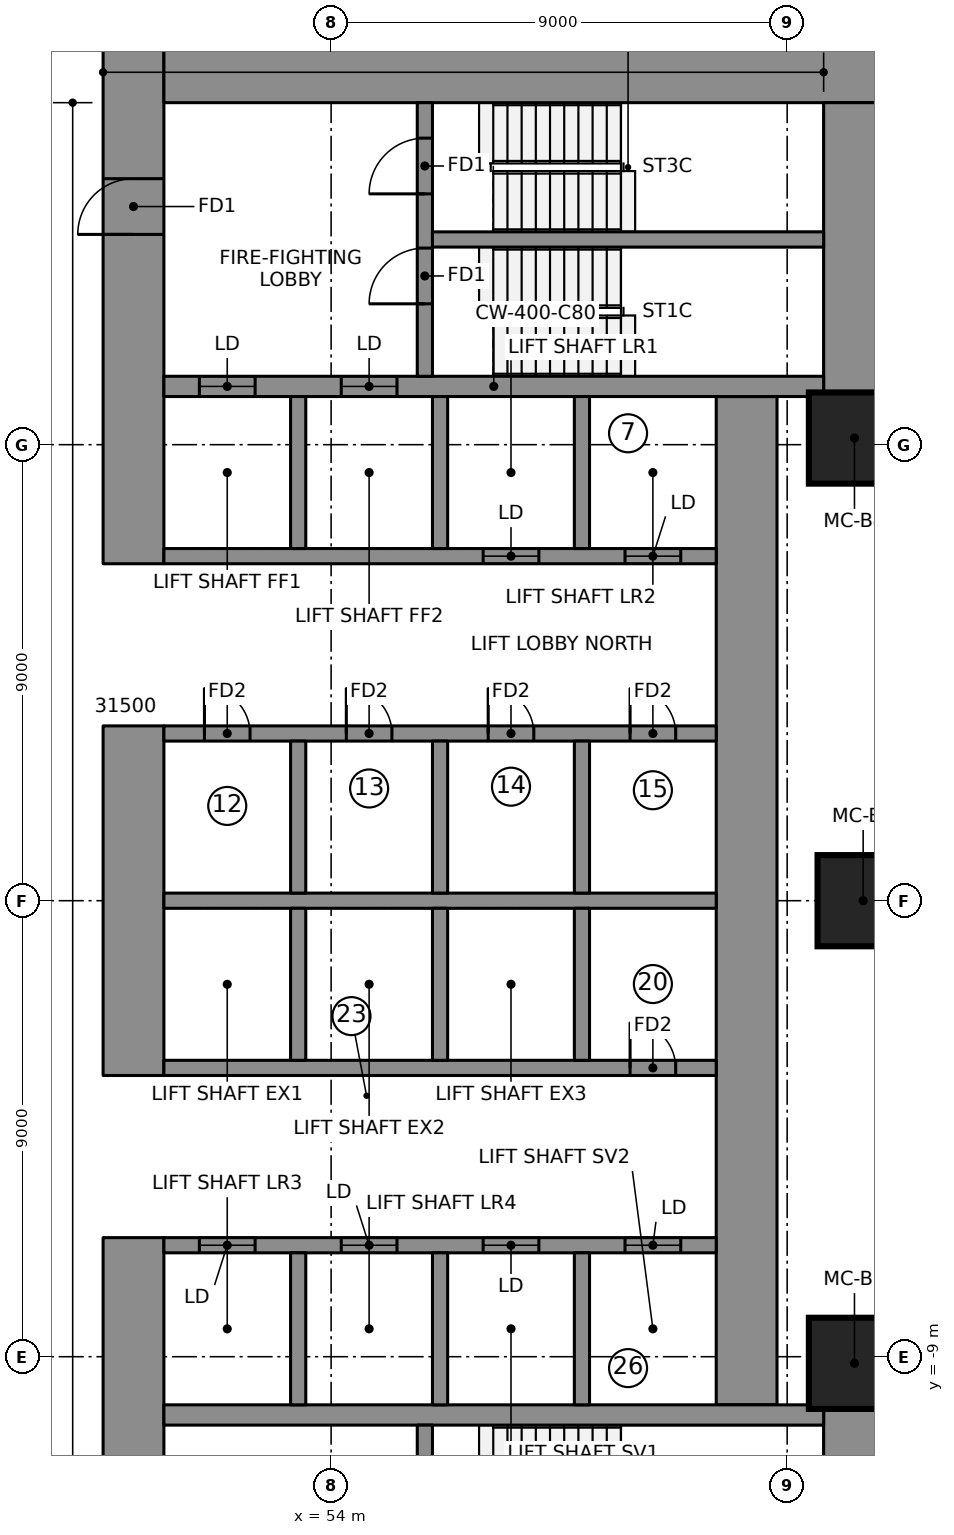
"""IFC4 building model, lengths in metres.
Left out: names, types, materials, properties, quantities, classifications, styles, units other than length and angle.
Written with IfcOpenShell. Run it as: python <this file> out.ifc"""

import sys

from ifc_helpers import new_model, si_unit, direction, frame, frame_2d, origin, origin_2d, place, context, subcontext, project, spatial, rectangle, extrude, element, fill, save


model = new_model("IFC4")
c1 = context("Model", 3, precision=1e-05, world=origin(), true_north=direction((0.0, 1.0)))
c2 = subcontext(c1, "Body", "Model", "MODEL_VIEW")
j1 = project(units=[si_unit("LENGTHUNIT", "METRE"), si_unit("PLANEANGLEUNIT", "RADIAN")], contexts=[c1])
p1 = place(None, origin())
s1 = spatial("IfcSite", under=j1, at=p1, CompositionType="ELEMENT")
p2 = place(p1, origin())
s2 = spatial("IfcBuilding", under=s1, at=p2, CompositionType="ELEMENT")
p3 = place(p2, frame((0.0, 0.0, 71.55)))
s3 = spatial("IfcBuildingStorey", under=s2, at=p3, CompositionType="ELEMENT", Elevation=71.55)
p4 = place(p3, frame((50.1, 6.65, 0.0), z_axis=(0.0, 0.0, 1.0), x_axis=(0.0, 1.0, 0.0)))
e1 = element("IfcWall", 1, at=p4, inside=s3, PredefinedType="SHEAR", context=c2, shape_type="SweptSolid", body=[
    extrude(rectangle(XDim=10.3, YDim=1.2, at=frame_2d((5.15, 0.0))), origin(), (0.0, 0.0, 1.0), 3.55),
])
p5 = place(p4, frame((6.5, 0.0, 0.0)))
e2 = element("IfcOpeningElement", 2, at=p5, cuts=e1, PredefinedType="OPENING", context=c2, shape_type="SweptSolid", body=[
    extrude(rectangle(XDim=1.1, YDim=2.1, at=frame_2d((0.55, 1.05))), frame((0.0, 0.61, 0.0), z_axis=(0.0, -1.0, 0.0), x_axis=(1.0, 0.0, 0.0)), (0.0, 0.0, 1.0), 1.22),
])
p6 = place(p3, frame((50.1, -3.45, 0.0), z_axis=(0.0, 0.0, 1.0), x_axis=(0.0, 1.0, 0.0)))
e3 = element("IfcWall", 3, at=p6, inside=s3, PredefinedType="SHEAR", context=c2, shape_type="SweptSolid", body=[
    extrude(rectangle(XDim=6.9, YDim=1.2, at=frame_2d((3.45, 0.0))), origin(), (0.0, 0.0, 1.0), 3.55),
])
p7 = place(p3, frame((50.1, -16.95, 0.0), z_axis=(0.0, 0.0, 1.0), x_axis=(0.0, 1.0, 0.0)))
e4 = element("IfcWall", 4, at=p7, inside=s3, PredefinedType="SHEAR", context=c2, shape_type="SweptSolid", body=[
    extrude(rectangle(XDim=10.3, YDim=1.2, at=frame_2d((5.15, 0.0))), origin(), (0.0, 0.0, 1.0), 3.55),
])
p8 = place(p7, frame((2.7, 0.0, 0.0)))
e5 = element("IfcOpeningElement", 5, at=p8, cuts=e4, PredefinedType="OPENING", context=c2, shape_type="SweptSolid", body=[
    extrude(rectangle(XDim=1.1, YDim=2.1, at=frame_2d((0.55, 1.05))), frame((0.0, 0.61, 0.0), z_axis=(0.0, -1.0, 0.0), x_axis=(1.0, 0.0, 0.0)), (0.0, 0.0, 1.0), 1.22),
])
p9 = place(p3, frame((50.7, 16.35, 0.0), z_axis=(0.0, 0.0, 1.0), x_axis=(1.0, 0.0, 0.0)))
e6 = element("IfcWall", 6, at=p9, inside=s3, PredefinedType="SHEAR", context=c2, shape_type="SweptSolid", body=[
    extrude(rectangle(XDim=14.22, YDim=1.2, at=frame_2d((7.11, 0.0))), origin(), (0.0, 0.0, 1.0), 3.55),
])
for number, where, z_axis, x_axis in (
    (7, (64.32, 9.95, 0.0), (0.0, 0.0, 1.0), (0.0, 1.0, 0.0)),
    (8, (64.32, -15.75, 0.0), (0.0, 0.0, 1.0), (0.0, 1.0, 0.0)),
):
    element("IfcWall", number, at=place(p3, frame(where, z_axis=z_axis, x_axis=x_axis)), inside=s3, PredefinedType="SHEAR", context=c2, shape_type="SweptSolid", body=[
        extrude(rectangle(XDim=5.8, YDim=1.2, at=frame_2d((2.9, 0.0))), origin(), (0.0, 0.0, 1.0), 3.55),
    ])
p10 = place(p3, frame((62.2, -9.95, 0.0), z_axis=(0.0, 0.0, 1.0), x_axis=(0.0, 1.0, 0.0)))
e9 = element("IfcWall", 9, at=p10, inside=s3, PredefinedType="SHEAR", context=c2, shape_type="SweptSolid", body=[
    extrude(rectangle(XDim=19.9, YDim=1.2, at=frame_2d((9.95, 0.0))), origin(), (0.0, 0.0, 1.0), 3.55),
])
p11 = place(p3, frame((50.7, 10.15, 0.0), z_axis=(0.0, 0.0, 1.0), x_axis=(1.0, 0.0, 0.0)))
e10 = element("IfcWall", 10, at=p11, inside=s3, PredefinedType="SHEAR", context=c2, shape_type="SweptSolid", body=[
    extrude(rectangle(XDim=13.02, YDim=0.4, at=frame_2d((6.51, 0.0))), origin(), (0.0, 0.0, 1.0), 3.55),
])
p12 = place(p11, frame((0.7, 0.0, 0.0)))
e11 = element("IfcOpeningElement", 11, at=p12, cuts=e10, PredefinedType="OPENING", context=c2, shape_type="SweptSolid", body=[
    extrude(rectangle(XDim=1.1, YDim=2.1, at=frame_2d((0.55, 1.05))), frame((0.0, 0.21, 0.0), z_axis=(0.0, -1.0, 0.0), x_axis=(1.0, 0.0, 0.0)), (0.0, 0.0, 1.0), 0.42),
])
p13 = place(p11, frame((3.5, 0.0, 0.0)))
e12 = element("IfcOpeningElement", 12, at=p13, cuts=e10, PredefinedType="OPENING", context=c2, shape_type="SweptSolid", body=[
    extrude(rectangle(XDim=1.1, YDim=2.1, at=frame_2d((0.55, 1.05))), frame((0.0, 0.21, 0.0), z_axis=(0.0, -1.0, 0.0), x_axis=(1.0, 0.0, 0.0)), (0.0, 0.0, 1.0), 0.42),
])
p14 = place(p3, frame((50.7, -10.15, 0.0), z_axis=(0.0, 0.0, 1.0), x_axis=(1.0, 0.0, 0.0)))
e13 = element("IfcWall", 13, at=p14, inside=s3, PredefinedType="SHEAR", context=c2, shape_type="SweptSolid", body=[
    extrude(rectangle(XDim=13.02, YDim=0.4, at=frame_2d((6.51, 0.0))), origin(), (0.0, 0.0, 1.0), 3.55),
])
p15 = place(p3, frame((50.7, 0.0, 0.0), z_axis=(0.0, 0.0, 1.0), x_axis=(1.0, 0.0, 0.0)))
e14 = element("IfcWall", 14, at=p15, inside=s3, PredefinedType="SHEAR", context=c2, shape_type="SweptSolid", body=[
    extrude(rectangle(XDim=10.9, YDim=0.3, at=frame_2d((5.45, 0.0))), origin(), (0.0, 0.0, 1.0), 3.55),
])
p16 = place(p3, frame((50.7, 3.3, 0.0), z_axis=(0.0, 0.0, 1.0), x_axis=(1.0, 0.0, 0.0)))
e15 = element("IfcWall", 15, at=p16, inside=s3, PredefinedType="SHEAR", context=c2, shape_type="SweptSolid", body=[
    extrude(rectangle(XDim=10.9, YDim=0.3, at=frame_2d((5.45, 0.0))), origin(), (0.0, 0.0, 1.0), 3.55),
])
p17 = place(p16, frame((0.8, 0.0, 0.0)))
e16 = element("IfcOpeningElement", 16, at=p17, cuts=e15, PredefinedType="OPENING", context=c2, shape_type="SweptSolid", body=[
    extrude(rectangle(XDim=0.9, YDim=2.1, at=frame_2d((0.45, 1.05))), frame((0.0, 0.16, 0.0), z_axis=(0.0, -1.0, 0.0), x_axis=(1.0, 0.0, 0.0)), (0.0, 0.0, 1.0), 0.32),
])
p18 = place(p16, frame((3.6, 0.0, 0.0)))
e17 = element("IfcOpeningElement", 17, at=p18, cuts=e15, PredefinedType="OPENING", context=c2, shape_type="SweptSolid", body=[
    extrude(rectangle(XDim=0.9, YDim=2.1, at=frame_2d((0.45, 1.05))), frame((0.0, 0.16, 0.0), z_axis=(0.0, -1.0, 0.0), x_axis=(1.0, 0.0, 0.0)), (0.0, 0.0, 1.0), 0.32),
])
p19 = place(p16, frame((6.4, 0.0, 0.0)))
e18 = element("IfcOpeningElement", 18, at=p19, cuts=e15, PredefinedType="OPENING", context=c2, shape_type="SweptSolid", body=[
    extrude(rectangle(XDim=0.9, YDim=2.1, at=frame_2d((0.45, 1.05))), frame((0.0, 0.16, 0.0), z_axis=(0.0, -1.0, 0.0), x_axis=(1.0, 0.0, 0.0)), (0.0, 0.0, 1.0), 0.32),
])
p20 = place(p16, frame((9.2, 0.0, 0.0)))
e19 = element("IfcOpeningElement", 19, at=p20, cuts=e15, PredefinedType="OPENING", context=c2, shape_type="SweptSolid", body=[
    extrude(rectangle(XDim=0.9, YDim=2.1, at=frame_2d((0.45, 1.05))), frame((0.0, 0.16, 0.0), z_axis=(0.0, -1.0, 0.0), x_axis=(1.0, 0.0, 0.0)), (0.0, 0.0, 1.0), 0.32),
])
p21 = place(p3, frame((50.7, 6.8, 0.0), z_axis=(0.0, 0.0, 1.0), x_axis=(1.0, 0.0, 0.0)))
e20 = element("IfcWall", 20, at=p21, inside=s3, PredefinedType="SHEAR", context=c2, shape_type="SweptSolid", body=[
    extrude(rectangle(XDim=10.9, YDim=0.3, at=frame_2d((5.45, 0.0))), origin(), (0.0, 0.0, 1.0), 3.55),
])
p22 = place(p21, frame((6.3, 0.0, 0.0)))
e21 = element("IfcOpeningElement", 21, at=p22, cuts=e20, PredefinedType="OPENING", context=c2, shape_type="SweptSolid", body=[
    extrude(rectangle(XDim=1.1, YDim=2.1, at=frame_2d((0.55, 1.05))), frame((0.0, 0.16, 0.0), z_axis=(0.0, -1.0, 0.0), x_axis=(1.0, 0.0, 0.0)), (0.0, 0.0, 1.0), 0.32),
])
p23 = place(p21, frame((9.1, 0.0, 0.0)))
e22 = element("IfcOpeningElement", 22, at=p23, cuts=e20, PredefinedType="OPENING", context=c2, shape_type="SweptSolid", body=[
    extrude(rectangle(XDim=1.1, YDim=2.1, at=frame_2d((0.55, 1.05))), frame((0.0, 0.16, 0.0), z_axis=(0.0, -1.0, 0.0), x_axis=(1.0, 0.0, 0.0)), (0.0, 0.0, 1.0), 0.32),
])
for number, where, z_axis, x_axis in (
    (23, (53.35, 0.15, 0.0), (0.0, 0.0, 1.0), (0.0, 1.0, 0.0)),
    (24, (53.35, 6.95, 0.0), (0.0, 0.0, 1.0), (0.0, 1.0, 0.0)),
    (25, (56.15, 0.15, 0.0), (0.0, 0.0, 1.0), (0.0, 1.0, 0.0)),
    (26, (56.15, 6.95, 0.0), (0.0, 0.0, 1.0), (0.0, 1.0, 0.0)),
    (27, (58.95, 0.15, 0.0), (0.0, 0.0, 1.0), (0.0, 1.0, 0.0)),
    (28, (58.95, 6.95, 0.0), (0.0, 0.0, 1.0), (0.0, 1.0, 0.0)),
):
    element("IfcWall", number, at=place(p3, frame(where, z_axis=z_axis, x_axis=x_axis)), inside=s3, PredefinedType="SHEAR", context=c2, shape_type="SweptSolid", body=[
        extrude(rectangle(XDim=3.0, YDim=0.3, at=frame_2d((1.5, 0.0))), origin(), (0.0, 0.0, 1.0), 3.55),
    ])
p24 = place(p3, frame((50.7, -3.3, 0.0), z_axis=(0.0, 0.0, 1.0), x_axis=(1.0, 0.0, 0.0)))
e29 = element("IfcWall", 29, at=p24, inside=s3, PredefinedType="SHEAR", context=c2, shape_type="SweptSolid", body=[
    extrude(rectangle(XDim=10.9, YDim=0.3, at=frame_2d((5.45, 0.0))), origin(), (0.0, 0.0, 1.0), 3.55),
])
p25 = place(p24, frame((9.2, 0.0, 0.0)))
e30 = element("IfcOpeningElement", 30, at=p25, cuts=e29, PredefinedType="OPENING", context=c2, shape_type="SweptSolid", body=[
    extrude(rectangle(XDim=0.9, YDim=2.1, at=frame_2d((0.45, 1.05))), frame((0.0, 0.16, 0.0), z_axis=(0.0, -1.0, 0.0), x_axis=(1.0, 0.0, 0.0)), (0.0, 0.0, 1.0), 0.32),
])
p26 = place(p3, frame((50.7, -6.8, 0.0), z_axis=(0.0, 0.0, 1.0), x_axis=(1.0, 0.0, 0.0)))
e31 = element("IfcWall", 31, at=p26, inside=s3, PredefinedType="SHEAR", context=c2, shape_type="SweptSolid", body=[
    extrude(rectangle(XDim=10.9, YDim=0.3, at=frame_2d((5.45, 0.0))), origin(), (0.0, 0.0, 1.0), 3.55),
])
p27 = place(p26, frame((0.7, 0.0, 0.0)))
e32 = element("IfcOpeningElement", 32, at=p27, cuts=e31, PredefinedType="OPENING", context=c2, shape_type="SweptSolid", body=[
    extrude(rectangle(XDim=1.1, YDim=2.1, at=frame_2d((0.55, 1.05))), frame((0.0, 0.16, 0.0), z_axis=(0.0, -1.0, 0.0), x_axis=(1.0, 0.0, 0.0)), (0.0, 0.0, 1.0), 0.32),
])
p28 = place(p26, frame((3.5, 0.0, 0.0)))
e33 = element("IfcOpeningElement", 33, at=p28, cuts=e31, PredefinedType="OPENING", context=c2, shape_type="SweptSolid", body=[
    extrude(rectangle(XDim=1.1, YDim=2.1, at=frame_2d((0.55, 1.05))), frame((0.0, 0.16, 0.0), z_axis=(0.0, -1.0, 0.0), x_axis=(1.0, 0.0, 0.0)), (0.0, 0.0, 1.0), 0.32),
])
p29 = place(p26, frame((6.3, 0.0, 0.0)))
e34 = element("IfcOpeningElement", 34, at=p29, cuts=e31, PredefinedType="OPENING", context=c2, shape_type="SweptSolid", body=[
    extrude(rectangle(XDim=1.1, YDim=2.1, at=frame_2d((0.55, 1.05))), frame((0.0, 0.16, 0.0), z_axis=(0.0, -1.0, 0.0), x_axis=(1.0, 0.0, 0.0)), (0.0, 0.0, 1.0), 0.32),
])
p30 = place(p26, frame((9.1, 0.0, 0.0)))
e35 = element("IfcOpeningElement", 35, at=p30, cuts=e31, PredefinedType="OPENING", context=c2, shape_type="SweptSolid", body=[
    extrude(rectangle(XDim=1.1, YDim=2.1, at=frame_2d((0.55, 1.05))), frame((0.0, 0.16, 0.0), z_axis=(0.0, -1.0, 0.0), x_axis=(1.0, 0.0, 0.0)), (0.0, 0.0, 1.0), 0.32),
])
for number, where, z_axis, x_axis in (
    (36, (53.35, -3.15, 0.0), (0.0, 0.0, 1.0), (0.0, 1.0, 0.0)),
    (37, (53.35, -9.95, 0.0), (0.0, 0.0, 1.0), (0.0, 1.0, 0.0)),
    (38, (56.15, -3.15, 0.0), (0.0, 0.0, 1.0), (0.0, 1.0, 0.0)),
    (39, (56.15, -9.95, 0.0), (0.0, 0.0, 1.0), (0.0, 1.0, 0.0)),
    (40, (58.95, -3.15, 0.0), (0.0, 0.0, 1.0), (0.0, 1.0, 0.0)),
    (41, (58.95, -9.95, 0.0), (0.0, 0.0, 1.0), (0.0, 1.0, 0.0)),
):
    element("IfcWall", number, at=place(p3, frame(where, z_axis=z_axis, x_axis=x_axis)), inside=s3, PredefinedType="SHEAR", context=c2, shape_type="SweptSolid", body=[
        extrude(rectangle(XDim=3.0, YDim=0.3, at=frame_2d((1.5, 0.0))), origin(), (0.0, 0.0, 1.0), 3.55),
    ])
p31 = place(p3, frame((55.85, 10.35, 0.0), z_axis=(0.0, 0.0, 1.0), x_axis=(0.0, 1.0, 0.0)))
e42 = element("IfcWall", 42, at=p31, inside=s3, PredefinedType="SHEAR", context=c2, shape_type="SweptSolid", body=[
    extrude(rectangle(XDim=5.4, YDim=0.3, at=frame_2d((2.7, 0.0))), origin(), (0.0, 0.0, 1.0), 3.55),
])
p32 = place(p31, frame((1.43, 0.0, 0.0)))
e43 = element("IfcOpeningElement", 43, at=p32, cuts=e42, PredefinedType="OPENING", context=c2, shape_type="SweptSolid", body=[
    extrude(rectangle(XDim=1.1, YDim=2.1, at=frame_2d((0.55, 1.05))), frame((0.0, 0.16, 0.0), z_axis=(0.0, -1.0, 0.0), x_axis=(1.0, 0.0, 0.0)), (0.0, 0.0, 1.0), 0.32),
])
p33 = place(p31, frame((3.6, 0.0, 0.0)))
e44 = element("IfcOpeningElement", 44, at=p33, cuts=e42, PredefinedType="OPENING", context=c2, shape_type="SweptSolid", body=[
    extrude(rectangle(XDim=1.1, YDim=2.1, at=frame_2d((0.55, 1.05))), frame((0.0, 0.16, 0.0), z_axis=(0.0, -1.0, 0.0), x_axis=(1.0, 0.0, 0.0)), (0.0, 0.0, 1.0), 0.32),
])
p34 = place(p3, frame((55.85, -15.75, 0.0), z_axis=(0.0, 0.0, 1.0), x_axis=(0.0, 1.0, 0.0)))
e45 = element("IfcWall", 45, at=p34, inside=s3, PredefinedType="SHEAR", context=c2, shape_type="SweptSolid", body=[
    extrude(rectangle(XDim=5.4, YDim=0.3, at=frame_2d((2.7, 0.0))), origin(), (0.0, 0.0, 1.0), 3.55),
])
p35 = place(p34, frame((3.6, 0.0, 0.0)))
e46 = element("IfcOpeningElement", 46, at=p35, cuts=e45, PredefinedType="OPENING", context=c2, shape_type="SweptSolid", body=[
    extrude(rectangle(XDim=1.1, YDim=2.1, at=frame_2d((0.55, 1.05))), frame((0.0, 0.16, 0.0), z_axis=(0.0, -1.0, 0.0), x_axis=(1.0, 0.0, 0.0)), (0.0, 0.0, 1.0), 0.32),
])
p36 = place(p34, frame((0.8, 0.0, 0.0)))
e47 = element("IfcOpeningElement", 47, at=p36, cuts=e45, PredefinedType="OPENING", context=c2, shape_type="SweptSolid", body=[
    extrude(rectangle(XDim=0.9, YDim=2.1, at=frame_2d((0.45, 1.05))), frame((0.0, 0.16, 0.0), z_axis=(0.0, -1.0, 0.0), x_axis=(1.0, 0.0, 0.0)), (0.0, 0.0, 1.0), 0.32),
])
p37 = place(p3, frame((56.0, 13.05, 0.0), z_axis=(0.0, 0.0, 1.0), x_axis=(1.0, 0.0, 0.0)))
e48 = element("IfcWall", 48, at=p37, inside=s3, PredefinedType="SHEAR", context=c2, shape_type="SweptSolid", body=[
    extrude(rectangle(XDim=7.72, YDim=0.3, at=frame_2d((3.86, 0.0))), origin(), (0.0, 0.0, 1.0), 3.55),
])
for number, where, z_axis, x_axis in (
    (49, (64.328, -9.131, 0.0), (0.0, 0.0, 1.0), (1.0, 0.0, 0.0)),
    (50, (64.5, 0.0, 0.0), (0.0, 0.0, 1.0), (1.0, 0.0, 0.0)),
    (51, (64.328, 9.131, 0.0), (0.0, 0.0, 1.0), (1.0, 0.0, 0.0)),
):
    element("IfcColumn", number, at=place(p3, frame(where, z_axis=z_axis, x_axis=x_axis)), inside=s3, PredefinedType="COLUMN", context=c2, shape_type="SweptSolid", body=[
        extrude(rectangle(XDim=1.8, YDim=1.8, at=origin_2d()), origin(), (0.0, 0.0, 1.0), 3.55),
    ])
p38 = place(p12, origin())
e52 = element("IfcDoor", 52, at=p38, inside=s3, OperationType="DOUBLE_DOOR_SLIDING", PredefinedType="DOOR", context=c2, shape_type="SweptSolid", body=[
    extrude(rectangle(XDim=1.1, YDim=2.1, at=frame_2d((0.55, 1.05))), frame((0.0, 0.025, 0.0), z_axis=(0.0, -1.0, 0.0), x_axis=(1.0, 0.0, 0.0)), (0.0, 0.0, 1.0), 0.05),
])
fill(e11, e52)
p39 = place(p13, origin())
e53 = element("IfcDoor", 53, at=p39, inside=s3, OperationType="DOUBLE_DOOR_SLIDING", PredefinedType="DOOR", context=c2, shape_type="SweptSolid", body=[
    extrude(rectangle(XDim=1.1, YDim=2.1, at=frame_2d((0.55, 1.05))), frame((0.0, 0.025, 0.0), z_axis=(0.0, -1.0, 0.0), x_axis=(1.0, 0.0, 0.0)), (0.0, 0.0, 1.0), 0.05),
])
fill(e12, e53)
p40 = place(p22, origin())
e54 = element("IfcDoor", 54, at=p40, inside=s3, OperationType="DOUBLE_DOOR_SLIDING", PredefinedType="DOOR", context=c2, shape_type="SweptSolid", body=[
    extrude(rectangle(XDim=1.1, YDim=2.1, at=frame_2d((0.55, 1.05))), frame((0.0, 0.025, 0.0), z_axis=(0.0, -1.0, 0.0), x_axis=(1.0, 0.0, 0.0)), (0.0, 0.0, 1.0), 0.05),
])
fill(e21, e54)
p41 = place(p23, origin())
e55 = element("IfcDoor", 55, at=p41, inside=s3, OperationType="DOUBLE_DOOR_SLIDING", PredefinedType="DOOR", context=c2, shape_type="SweptSolid", body=[
    extrude(rectangle(XDim=1.1, YDim=2.1, at=frame_2d((0.55, 1.05))), frame((0.0, 0.025, 0.0), z_axis=(0.0, -1.0, 0.0), x_axis=(1.0, 0.0, 0.0)), (0.0, 0.0, 1.0), 0.05),
])
fill(e22, e55)
p42 = place(p27, origin())
e56 = element("IfcDoor", 56, at=p42, inside=s3, OperationType="DOUBLE_DOOR_SLIDING", PredefinedType="DOOR", context=c2, shape_type="SweptSolid", body=[
    extrude(rectangle(XDim=1.1, YDim=2.1, at=frame_2d((0.55, 1.05))), frame((0.0, 0.025, 0.0), z_axis=(0.0, -1.0, 0.0), x_axis=(1.0, 0.0, 0.0)), (0.0, 0.0, 1.0), 0.05),
])
fill(e32, e56)
p43 = place(p28, origin())
e57 = element("IfcDoor", 57, at=p43, inside=s3, OperationType="DOUBLE_DOOR_SLIDING", PredefinedType="DOOR", context=c2, shape_type="SweptSolid", body=[
    extrude(rectangle(XDim=1.1, YDim=2.1, at=frame_2d((0.55, 1.05))), frame((0.0, 0.025, 0.0), z_axis=(0.0, -1.0, 0.0), x_axis=(1.0, 0.0, 0.0)), (0.0, 0.0, 1.0), 0.05),
])
fill(e33, e57)
p44 = place(p29, origin())
e58 = element("IfcDoor", 58, at=p44, inside=s3, OperationType="DOUBLE_DOOR_SLIDING", PredefinedType="DOOR", context=c2, shape_type="SweptSolid", body=[
    extrude(rectangle(XDim=1.1, YDim=2.1, at=frame_2d((0.55, 1.05))), frame((0.0, 0.025, 0.0), z_axis=(0.0, -1.0, 0.0), x_axis=(1.0, 0.0, 0.0)), (0.0, 0.0, 1.0), 0.05),
])
fill(e34, e58)
p45 = place(p30, origin())
e59 = element("IfcDoor", 59, at=p45, inside=s3, OperationType="DOUBLE_DOOR_SLIDING", PredefinedType="DOOR", context=c2, shape_type="SweptSolid", body=[
    extrude(rectangle(XDim=1.1, YDim=2.1, at=frame_2d((0.55, 1.05))), frame((0.0, 0.025, 0.0), z_axis=(0.0, -1.0, 0.0), x_axis=(1.0, 0.0, 0.0)), (0.0, 0.0, 1.0), 0.05),
])
fill(e35, e59)
p46 = place(p32, origin())
e60 = element("IfcDoor", 60, at=p46, inside=s3, OperationType="SINGLE_SWING_RIGHT", PredefinedType="DOOR", context=c2, shape_type="SweptSolid", body=[
    extrude(rectangle(XDim=1.1, YDim=2.1, at=frame_2d((0.55, 1.05))), frame((0.0, 0.025, 0.0), z_axis=(0.0, -1.0, 0.0), x_axis=(1.0, 0.0, 0.0)), (0.0, 0.0, 1.0), 0.05),
])
fill(e43, e60)
p47 = place(p33, origin())
e61 = element("IfcDoor", 61, at=p47, inside=s3, OperationType="SINGLE_SWING_RIGHT", PredefinedType="DOOR", context=c2, shape_type="SweptSolid", body=[
    extrude(rectangle(XDim=1.1, YDim=2.1, at=frame_2d((0.55, 1.05))), frame((0.0, 0.025, 0.0), z_axis=(0.0, -1.0, 0.0), x_axis=(1.0, 0.0, 0.0)), (0.0, 0.0, 1.0), 0.05),
])
fill(e44, e61)
p48 = place(p5, origin())
e62 = element("IfcDoor", 62, at=p48, inside=s3, OperationType="SINGLE_SWING_RIGHT", PredefinedType="DOOR", context=c2, shape_type="SweptSolid", body=[
    extrude(rectangle(XDim=1.1, YDim=2.1, at=frame_2d((0.55, 1.05))), frame((0.0, 0.025, 0.0), z_axis=(0.0, -1.0, 0.0), x_axis=(1.0, 0.0, 0.0)), (0.0, 0.0, 1.0), 0.05),
])
fill(e2, e62)
p49 = place(p17, origin())
e63 = element("IfcDoor", 63, at=p49, inside=s3, OperationType="SINGLE_SWING_LEFT", PredefinedType="DOOR", context=c2, shape_type="SweptSolid", body=[
    extrude(rectangle(XDim=0.9, YDim=2.1, at=frame_2d((0.45, 1.05))), frame((0.0, 0.025, 0.0), z_axis=(0.0, -1.0, 0.0), x_axis=(1.0, 0.0, 0.0)), (0.0, 0.0, 1.0), 0.05),
])
fill(e16, e63)
p50 = place(p18, origin())
e64 = element("IfcDoor", 64, at=p50, inside=s3, OperationType="SINGLE_SWING_LEFT", PredefinedType="DOOR", context=c2, shape_type="SweptSolid", body=[
    extrude(rectangle(XDim=0.9, YDim=2.1, at=frame_2d((0.45, 1.05))), frame((0.0, 0.025, 0.0), z_axis=(0.0, -1.0, 0.0), x_axis=(1.0, 0.0, 0.0)), (0.0, 0.0, 1.0), 0.05),
])
fill(e17, e64)
p51 = place(p19, origin())
e65 = element("IfcDoor", 65, at=p51, inside=s3, OperationType="SINGLE_SWING_LEFT", PredefinedType="DOOR", context=c2, shape_type="SweptSolid", body=[
    extrude(rectangle(XDim=0.9, YDim=2.1, at=frame_2d((0.45, 1.05))), frame((0.0, 0.025, 0.0), z_axis=(0.0, -1.0, 0.0), x_axis=(1.0, 0.0, 0.0)), (0.0, 0.0, 1.0), 0.05),
])
fill(e18, e65)
p52 = place(p20, origin())
e66 = element("IfcDoor", 66, at=p52, inside=s3, OperationType="SINGLE_SWING_LEFT", PredefinedType="DOOR", context=c2, shape_type="SweptSolid", body=[
    extrude(rectangle(XDim=0.9, YDim=2.1, at=frame_2d((0.45, 1.05))), frame((0.0, 0.025, 0.0), z_axis=(0.0, -1.0, 0.0), x_axis=(1.0, 0.0, 0.0)), (0.0, 0.0, 1.0), 0.05),
])
fill(e19, e66)
p53 = place(p25, origin())
e67 = element("IfcDoor", 67, at=p53, inside=s3, OperationType="SINGLE_SWING_LEFT", PredefinedType="DOOR", context=c2, shape_type="SweptSolid", body=[
    extrude(rectangle(XDim=0.9, YDim=2.1, at=frame_2d((0.45, 1.05))), frame((0.0, 0.025, 0.0), z_axis=(0.0, -1.0, 0.0), x_axis=(1.0, 0.0, 0.0)), (0.0, 0.0, 1.0), 0.05),
])
fill(e30, e67)
save(model, sys.argv[1])
